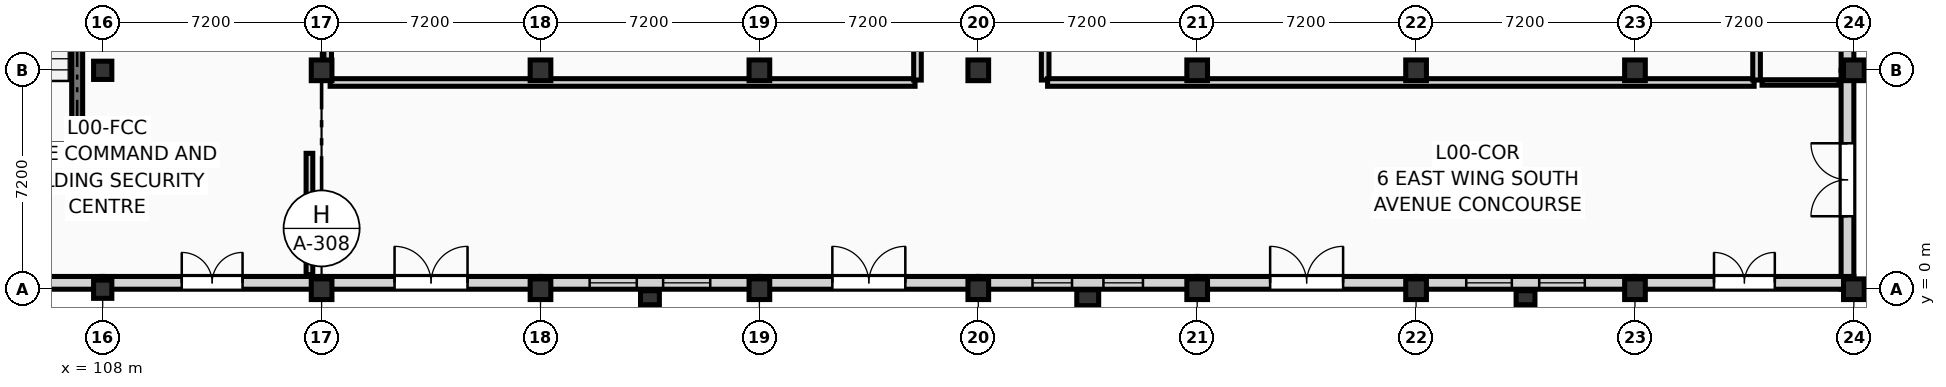
"""IFC4 building model, lengths in metres.
Left out: names, types, materials, properties, quantities, classifications, styles, units other than length and angle.
Written with IfcOpenShell. Run it as: python <this file> out.ifc"""

import sys

from ifc_helpers import new_model, si_unit, direction, frame, frame_2d, origin, origin_2d, place, context, subcontext, project, spatial, rectangle, extrude, element, fill, save


model = new_model("IFC4")
c1 = context("Model", 3, precision=1e-05, world=origin(), true_north=direction((0.0, 1.0)))
c2 = subcontext(c1, "Body", "Model", "MODEL_VIEW")
j1 = project(units=[si_unit("LENGTHUNIT", "METRE"), si_unit("PLANEANGLEUNIT", "RADIAN")], contexts=[c1])
p1 = place(None, origin())
s1 = spatial("IfcSite", under=j1, at=p1, CompositionType="ELEMENT")
p2 = place(p1, origin())
s2 = spatial("IfcBuilding", under=s1, at=p2, CompositionType="ELEMENT")
p3 = place(p2, origin())
s3 = spatial("IfcBuildingStorey", under=s2, at=p3, CompositionType="ELEMENT", Elevation=0.0)
for number, where, z_axis, x_axis in (
    (1, (108.0, 0.0, 0.0), (0.0, 0.0, 1.0), (1.0, 0.0, 0.0)),
    (2, (108.0, 7.2, 0.0), (0.0, 0.0, 1.0), (1.0, 0.0, 0.0)),
):
    element("IfcColumn", number, at=place(p3, frame(where, z_axis=z_axis, x_axis=x_axis)), inside=s3, PredefinedType="COLUMN", context=c2, shape_type="SweptSolid", body=[
        extrude(rectangle(XDim=0.6, YDim=0.6, at=origin_2d()), origin(), (0.0, 0.0, 1.0), 4.5),
    ])
for number, where, z_axis, x_axis in (
    (3, (115.2, 0.0, 0.0), (0.0, 0.0, 1.0), (1.0, 0.0, 0.0)),
    (4, (115.2, 7.2, 0.0), (0.0, 0.0, 1.0), (1.0, 0.0, 0.0)),
    (5, (122.4, 0.0, 0.0), (0.0, 0.0, 1.0), (1.0, 0.0, 0.0)),
    (6, (122.4, 7.2, 0.0), (0.0, 0.0, 1.0), (1.0, 0.0, 0.0)),
    (7, (129.6, 0.0, 0.0), (0.0, 0.0, 1.0), (1.0, 0.0, 0.0)),
    (8, (129.6, 7.2, 0.0), (0.0, 0.0, 1.0), (1.0, 0.0, 0.0)),
    (9, (136.8, 0.0, 0.0), (0.0, 0.0, 1.0), (1.0, 0.0, 0.0)),
    (10, (136.8, 7.2, 0.0), (0.0, 0.0, 1.0), (1.0, 0.0, 0.0)),
    (11, (144.0, 0.0, 0.0), (0.0, 0.0, 1.0), (1.0, 0.0, 0.0)),
    (12, (144.0, 7.2, 0.0), (0.0, 0.0, 1.0), (1.0, 0.0, 0.0)),
    (13, (151.2, 0.0, 0.0), (0.0, 0.0, 1.0), (1.0, 0.0, 0.0)),
    (14, (151.2, 7.2, 0.0), (0.0, 0.0, 1.0), (1.0, 0.0, 0.0)),
    (15, (158.4, 0.0, 0.0), (0.0, 0.0, 1.0), (1.0, 0.0, 0.0)),
    (16, (158.4, 7.2, 0.0), (0.0, 0.0, 1.0), (1.0, 0.0, 0.0)),
    (17, (165.6, 0.0, 0.0), (0.0, 0.0, 1.0), (1.0, 0.0, 0.0)),
    (18, (165.6, 7.2, 0.0), (0.0, 0.0, 1.0), (1.0, 0.0, 0.0)),
):
    element("IfcColumn", number, at=place(p3, frame(where, z_axis=z_axis, x_axis=x_axis)), inside=s3, PredefinedType="COLUMN", context=c2, shape_type="SweptSolid", body=[
        extrude(rectangle(XDim=0.68, YDim=0.68, at=origin_2d()), origin(), (0.0, 0.0, 1.0), 4.5),
    ])
p4 = place(p3, frame((126.0, -0.28, 0.0), z_axis=(0.0, 0.0, 1.0), x_axis=(0.0, 1.0, 0.0)))
e19 = element("IfcColumn", 19, at=p4, inside=s3, PredefinedType="PILASTER", context=c2, shape_type="SweptSolid", body=[
    extrude(rectangle(XDim=0.46, YDim=0.62, at=origin_2d()), origin(), (0.0, 0.0, 1.0), 4.5),
])
p5 = place(p3, frame((140.4, -0.28, 0.0), z_axis=(0.0, 0.0, 1.0), x_axis=(0.0, 1.0, 0.0)))
e20 = element("IfcColumn", 20, at=p5, inside=s3, PredefinedType="PILASTER", context=c2, shape_type="SweptSolid", body=[
    extrude(rectangle(XDim=0.52, YDim=0.72, at=origin_2d()), origin(), (0.0, 0.0, 1.0), 4.5),
])
p6 = place(p3, frame((154.8, -0.28, 0.0), z_axis=(0.0, 0.0, 1.0), x_axis=(0.0, 1.0, 0.0)))
e21 = element("IfcColumn", 21, at=p6, inside=s3, PredefinedType="PILASTER", context=c2, shape_type="SweptSolid", body=[
    extrude(rectangle(XDim=0.46, YDim=0.62, at=origin_2d()), origin(), (0.0, 0.0, 1.0), 4.5),
])
p7 = place(p3, frame((165.39, 7.2, 0.0), z_axis=(0.0, 0.0, 1.0), x_axis=(0.0, 1.0, 0.0)))
e22 = element("IfcWall", 22, at=p7, inside=s3, PredefinedType="SOLIDWALL", context=c2, shape_type="SweptSolid", body=[
    extrude(rectangle(XDim=7.2, YDim=0.42, at=frame_2d((3.6, 0.0))), origin(), (0.0, 0.0, 1.0), 3.62),
])
p8 = place(p7, frame((1.617, 0.0, 0.45)))
e23 = element("IfcOpeningElement", 23, at=p8, cuts=e22, PredefinedType="OPENING", context=c2, shape_type="SweptSolid", body=[
    extrude(rectangle(XDim=1.55, YDim=2.55, at=frame_2d((0.775, 1.275))), frame((0.0, 0.222, 0.0), z_axis=(0.0, -1.0, 0.0), x_axis=(1.0, 0.0, 0.0)), (0.0, 0.0, 1.0), 0.444),
])
p9 = place(p7, frame((4.033, 0.0, 0.45)))
e24 = element("IfcOpeningElement", 24, at=p9, cuts=e22, PredefinedType="OPENING", context=c2, shape_type="SweptSolid", body=[
    extrude(rectangle(XDim=1.55, YDim=2.55, at=frame_2d((0.775, 1.275))), frame((0.0, 0.222, 0.0), z_axis=(0.0, -1.0, 0.0), x_axis=(1.0, 0.0, 0.0)), (0.0, 0.0, 1.0), 0.444),
])
p10 = place(p3, frame((165.39, 0.0, 0.0), z_axis=(0.0, 0.0, 1.0), x_axis=(0.0, 1.0, 0.0)))
e25 = element("IfcWall", 25, at=p10, inside=s3, PredefinedType="SOLIDWALL", context=c2, shape_type="SweptSolid", body=[
    extrude(rectangle(XDim=7.2, YDim=0.42, at=frame_2d((3.6, 0.0))), origin(), (0.0, 0.0, 1.0), 3.62),
])
p11 = place(p10, frame((2.4, 0.0, 0.0)))
e26 = element("IfcOpeningElement", 26, at=p11, cuts=e25, PredefinedType="OPENING", context=c2, shape_type="SweptSolid", body=[
    extrude(rectangle(XDim=2.4, YDim=2.6, at=frame_2d((1.2, 1.3))), frame((0.0, 0.222, 0.0), z_axis=(0.0, -1.0, 0.0), x_axis=(1.0, 0.0, 0.0)), (0.0, 0.0, 1.0), 0.444),
])
p12 = place(p3, frame((158.4, 0.21, 0.0), z_axis=(0.0, 0.0, 1.0), x_axis=(1.0, 0.0, 0.0)))
e27 = element("IfcWall", 27, at=p12, inside=s3, PredefinedType="SOLIDWALL", context=c2, shape_type="SweptSolid", body=[
    extrude(rectangle(XDim=7.2, YDim=0.42, at=frame_2d((3.6, 0.0))), origin(), (0.0, 0.0, 1.0), 3.62),
])
p13 = place(p12, frame((2.6, 0.0, 0.0)))
e28 = element("IfcOpeningElement", 28, at=p13, cuts=e27, PredefinedType="OPENING", context=c2, shape_type="SweptSolid", body=[
    extrude(rectangle(XDim=2.0, YDim=2.4, at=frame_2d((1.0, 1.2))), frame((0.0, 0.222, 0.0), z_axis=(0.0, -1.0, 0.0), x_axis=(1.0, 0.0, 0.0)), (0.0, 0.0, 1.0), 0.444),
])
p14 = place(p3, frame((151.2, 0.21, 0.0), z_axis=(0.0, 0.0, 1.0), x_axis=(1.0, 0.0, 0.0)))
e29 = element("IfcWall", 29, at=p14, inside=s3, PredefinedType="SOLIDWALL", context=c2, shape_type="SweptSolid", body=[
    extrude(rectangle(XDim=7.2, YDim=0.42, at=frame_2d((3.6, 0.0))), origin(), (0.0, 0.0, 1.0), 3.62),
])
p15 = place(p14, frame((1.65, 0.0, 0.45)))
e30 = element("IfcOpeningElement", 30, at=p15, cuts=e29, PredefinedType="OPENING", context=c2, shape_type="SweptSolid", body=[
    extrude(rectangle(XDim=1.5, YDim=2.4, at=frame_2d((0.75, 1.2))), frame((0.0, 0.222, 0.0), z_axis=(0.0, -1.0, 0.0), x_axis=(1.0, 0.0, 0.0)), (0.0, 0.0, 1.0), 0.444),
])
p16 = place(p14, frame((4.05, 0.0, 0.45)))
e31 = element("IfcOpeningElement", 31, at=p16, cuts=e29, PredefinedType="OPENING", context=c2, shape_type="SweptSolid", body=[
    extrude(rectangle(XDim=1.5, YDim=2.4, at=frame_2d((0.75, 1.2))), frame((0.0, 0.222, 0.0), z_axis=(0.0, -1.0, 0.0), x_axis=(1.0, 0.0, 0.0)), (0.0, 0.0, 1.0), 0.444),
])
p17 = place(p3, frame((144.0, 0.21, 0.0), z_axis=(0.0, 0.0, 1.0), x_axis=(1.0, 0.0, 0.0)))
e32 = element("IfcWall", 32, at=p17, inside=s3, PredefinedType="SOLIDWALL", context=c2, shape_type="SweptSolid", body=[
    extrude(rectangle(XDim=7.2, YDim=0.42, at=frame_2d((3.6, 0.0))), origin(), (0.0, 0.0, 1.0), 3.62),
])
p18 = place(p17, frame((2.4, 0.0, 0.0)))
e33 = element("IfcOpeningElement", 33, at=p18, cuts=e32, PredefinedType="OPENING", context=c2, shape_type="SweptSolid", body=[
    extrude(rectangle(XDim=2.4, YDim=2.6, at=frame_2d((1.2, 1.3))), frame((0.0, 0.222, 0.0), z_axis=(0.0, -1.0, 0.0), x_axis=(1.0, 0.0, 0.0)), (0.0, 0.0, 1.0), 0.444),
])
p19 = place(p3, frame((136.8, 0.21, 0.0), z_axis=(0.0, 0.0, 1.0), x_axis=(1.0, 0.0, 0.0)))
e34 = element("IfcWall", 34, at=p19, inside=s3, PredefinedType="SOLIDWALL", context=c2, shape_type="SweptSolid", body=[
    extrude(rectangle(XDim=7.2, YDim=0.42, at=frame_2d((3.6, 0.0))), origin(), (0.0, 0.0, 1.0), 3.62),
])
p20 = place(p19, frame((1.783, 0.0, 0.45)))
e35 = element("IfcOpeningElement", 35, at=p20, cuts=e34, PredefinedType="OPENING", context=c2, shape_type="SweptSolid", body=[
    extrude(rectangle(XDim=1.3, YDim=2.35, at=frame_2d((0.65, 1.175))), frame((0.0, 0.222, 0.0), z_axis=(0.0, -1.0, 0.0), x_axis=(1.0, 0.0, 0.0)), (0.0, 0.0, 1.0), 0.444),
])
p21 = place(p19, frame((4.117, 0.0, 0.45)))
e36 = element("IfcOpeningElement", 36, at=p21, cuts=e34, PredefinedType="OPENING", context=c2, shape_type="SweptSolid", body=[
    extrude(rectangle(XDim=1.3, YDim=2.35, at=frame_2d((0.65, 1.175))), frame((0.0, 0.222, 0.0), z_axis=(0.0, -1.0, 0.0), x_axis=(1.0, 0.0, 0.0)), (0.0, 0.0, 1.0), 0.444),
])
p22 = place(p3, frame((129.6, 0.21, 0.0), z_axis=(0.0, 0.0, 1.0), x_axis=(1.0, 0.0, 0.0)))
e37 = element("IfcWall", 37, at=p22, inside=s3, PredefinedType="SOLIDWALL", context=c2, shape_type="SweptSolid", body=[
    extrude(rectangle(XDim=7.2, YDim=0.42, at=frame_2d((3.6, 0.0))), origin(), (0.0, 0.0, 1.0), 3.62),
])
p23 = place(p22, frame((2.4, 0.0, 0.0)))
e38 = element("IfcOpeningElement", 38, at=p23, cuts=e37, PredefinedType="OPENING", context=c2, shape_type="SweptSolid", body=[
    extrude(rectangle(XDim=2.4, YDim=2.6, at=frame_2d((1.2, 1.3))), frame((0.0, 0.222, 0.0), z_axis=(0.0, -1.0, 0.0), x_axis=(1.0, 0.0, 0.0)), (0.0, 0.0, 1.0), 0.444),
])
p24 = place(p3, frame((122.4, 0.21, 0.0), z_axis=(0.0, 0.0, 1.0), x_axis=(1.0, 0.0, 0.0)))
e39 = element("IfcWall", 39, at=p24, inside=s3, PredefinedType="SOLIDWALL", context=c2, shape_type="SweptSolid", body=[
    extrude(rectangle(XDim=7.2, YDim=0.42, at=frame_2d((3.6, 0.0))), origin(), (0.0, 0.0, 1.0), 3.62),
])
p25 = place(p24, frame((1.617, 0.0, 0.45)))
e40 = element("IfcOpeningElement", 40, at=p25, cuts=e39, PredefinedType="OPENING", context=c2, shape_type="SweptSolid", body=[
    extrude(rectangle(XDim=1.55, YDim=2.85, at=frame_2d((0.775, 1.425))), frame((0.0, 0.222, 0.0), z_axis=(0.0, -1.0, 0.0), x_axis=(1.0, 0.0, 0.0)), (0.0, 0.0, 1.0), 0.444),
])
p26 = place(p24, frame((4.033, 0.0, 0.45)))
e41 = element("IfcOpeningElement", 41, at=p26, cuts=e39, PredefinedType="OPENING", context=c2, shape_type="SweptSolid", body=[
    extrude(rectangle(XDim=1.55, YDim=2.85, at=frame_2d((0.775, 1.425))), frame((0.0, 0.222, 0.0), z_axis=(0.0, -1.0, 0.0), x_axis=(1.0, 0.0, 0.0)), (0.0, 0.0, 1.0), 0.444),
])
p27 = place(p3, frame((115.2, 0.21, 0.0), z_axis=(0.0, 0.0, 1.0), x_axis=(1.0, 0.0, 0.0)))
e42 = element("IfcWall", 42, at=p27, inside=s3, PredefinedType="SOLIDWALL", context=c2, shape_type="SweptSolid", body=[
    extrude(rectangle(XDim=7.2, YDim=0.42, at=frame_2d((3.6, 0.0))), origin(), (0.0, 0.0, 1.0), 3.62),
])
p28 = place(p27, frame((2.4, 0.0, 0.0)))
e43 = element("IfcOpeningElement", 43, at=p28, cuts=e42, PredefinedType="OPENING", context=c2, shape_type="SweptSolid", body=[
    extrude(rectangle(XDim=2.4, YDim=2.6, at=frame_2d((1.2, 1.3))), frame((0.0, 0.222, 0.0), z_axis=(0.0, -1.0, 0.0), x_axis=(1.0, 0.0, 0.0)), (0.0, 0.0, 1.0), 0.444),
])
p29 = place(p3, frame((108.0, 0.21, 0.0), z_axis=(0.0, 0.0, 1.0), x_axis=(1.0, 0.0, 0.0)))
e44 = element("IfcWall", 44, at=p29, inside=s3, PredefinedType="SOLIDWALL", context=c2, shape_type="SweptSolid", body=[
    extrude(rectangle(XDim=7.2, YDim=0.42, at=frame_2d((3.6, 0.0))), origin(), (0.0, 0.0, 1.0), 3.62),
])
p30 = place(p29, frame((2.6, 0.0, 0.0)))
e45 = element("IfcOpeningElement", 45, at=p30, cuts=e44, PredefinedType="OPENING", context=c2, shape_type="SweptSolid", body=[
    extrude(rectangle(XDim=2.0, YDim=2.4, at=frame_2d((1.0, 1.2))), frame((0.0, 0.222, 0.0), z_axis=(0.0, -1.0, 0.0), x_axis=(1.0, 0.0, 0.0)), (0.0, 0.0, 1.0), 0.444),
])
p31 = place(p3, frame((100.8, 0.21, 0.0), z_axis=(0.0, 0.0, 1.0), x_axis=(1.0, 0.0, 0.0)))
e46 = element("IfcWall", 46, at=p31, inside=s3, PredefinedType="SOLIDWALL", context=c2, shape_type="SweptSolid", body=[
    extrude(rectangle(XDim=7.2, YDim=0.42, at=frame_2d((3.6, 0.0))), origin(), (0.0, 0.0, 1.0), 3.62),
])
p32 = place(p31, frame((2.4, 0.0, 0.0)))
e47 = element("IfcOpeningElement", 47, at=p32, cuts=e46, PredefinedType="OPENING", context=c2, shape_type="SweptSolid", body=[
    extrude(rectangle(XDim=2.4, YDim=2.6, at=frame_2d((1.2, 1.3))), frame((0.0, 0.222, 0.0), z_axis=(0.0, -1.0, 0.0), x_axis=(1.0, 0.0, 0.0)), (0.0, 0.0, 1.0), 0.444),
])
p33 = place(p3, frame((101.46, 4.6, 0.0), z_axis=(0.0, 0.0, 1.0), x_axis=(1.0, 0.0, 0.0)))
e48 = element("IfcWall", 48, at=p33, inside=s3, PredefinedType="SHEAR", context=c2, shape_type="SweptSolid", body=[
    extrude(rectangle(XDim=5.88, YDim=0.36, at=frame_2d((2.94, 0.0))), origin(), (0.0, 0.0, 1.0), 4.25),
])
p34 = place(p33, frame((0.22, 0.0, 0.0)))
e49 = element("IfcOpeningElement", 49, at=p34, cuts=e48, PredefinedType="OPENING", context=c2, shape_type="SweptSolid", body=[
    extrude(rectangle(XDim=1.8, YDim=2.2, at=frame_2d((0.9, 1.1))), frame((0.0, 0.192, 0.0), z_axis=(0.0, -1.0, 0.0), x_axis=(1.0, 0.0, 0.0)), (0.0, 0.0, 1.0), 0.384),
])
p35 = place(p3, frame((107.16, 4.78, 0.0), z_axis=(0.0, 0.0, 1.0), x_axis=(0.0, 1.0, 0.0)))
e50 = element("IfcWall", 50, at=p35, inside=s3, PredefinedType="SHEAR", context=c2, shape_type="SweptSolid", body=[
    extrude(rectangle(XDim=8.59, YDim=0.36, at=frame_2d((4.295, 0.0))), origin(), (0.0, 0.0, 1.0), 4.25),
])
p36 = place(p3, frame((114.8, 0.48, 0.0), z_axis=(0.0, 0.0, 1.0), x_axis=(0.0, 1.0, 0.0)))
e51 = element("IfcWall", 51, at=p36, inside=s3, PredefinedType="PARTITIONING", context=c2, shape_type="SweptSolid", body=[
    extrude(rectangle(XDim=3.99, YDim=0.22, at=frame_2d((1.995, 0.0))), origin(), (0.0, 0.0, 1.0), 3.385),
])
p37 = place(p3, frame((115.4, 6.88, 0.0), z_axis=(0.0, 0.0, 1.0), x_axis=(0.0, 1.0, 0.0)))
e52 = element("IfcWall", 52, at=p37, inside=s3, PredefinedType="PARTITIONING", context=c2, shape_type="SweptSolid", body=[
    extrude(rectangle(XDim=17.14, YDim=0.25, at=frame_2d((8.57, 0.0))), origin(), (0.0, 0.0, 1.0), 3.385),
])
p38 = place(p37, frame((2.4, 0.0, 0.0)))
e53 = element("IfcOpeningElement", 53, at=p38, cuts=e52, PredefinedType="OPENING", context=c2, shape_type="SweptSolid", body=[
    extrude(rectangle(XDim=1.8, YDim=2.3, at=frame_2d((0.9, 1.15))), frame((0.0, 0.137, 0.0), z_axis=(0.0, -1.0, 0.0), x_axis=(1.0, 0.0, 0.0)), (0.0, 0.0, 1.0), 0.274),
])
p39 = place(p3, frame((115.48, 6.8, 0.0), z_axis=(0.0, 0.0, 1.0), x_axis=(1.0, 0.0, 0.0)))
e54 = element("IfcWall", 54, at=p39, inside=s3, PredefinedType="PARTITIONING", context=c2, shape_type="SweptSolid", body=[
    extrude(rectangle(XDim=19.24, YDim=0.25, at=frame_2d((9.62, 0.0))), origin(), (0.0, 0.0, 1.0), 7.525),
])
for number, where, z_axis, x_axis in (
    (55, (134.8, 6.88, 0.0), (0.0, 0.0, 1.0), (0.0, 1.0, 0.0)),
    (56, (139.0, 6.88, 0.0), (0.0, 0.0, 1.0), (0.0, 1.0, 0.0)),
):
    element("IfcWall", number, at=place(p3, frame(where, z_axis=z_axis, x_axis=x_axis)), inside=s3, PredefinedType="PARTITIONING", context=c2, shape_type="SweptSolid", body=[
        extrude(rectangle(XDim=17.14, YDim=0.25, at=frame_2d((8.57, 0.0))), origin(), (0.0, 0.0, 1.0), 8.185),
    ])
p40 = place(p3, frame((139.08, 6.8, 0.0), z_axis=(0.0, 0.0, 1.0), x_axis=(1.0, 0.0, 0.0)))
e57 = element("IfcWall", 57, at=p40, inside=s3, PredefinedType="PARTITIONING", context=c2, shape_type="SweptSolid", body=[
    extrude(rectangle(XDim=23.24, YDim=0.25, at=frame_2d((11.62, 0.0))), origin(), (0.0, 0.0, 1.0), 7.525),
])
p41 = place(p3, frame((162.4, 6.88, 0.0), z_axis=(0.0, 0.0, 1.0), x_axis=(0.0, 1.0, 0.0)))
e58 = element("IfcWall", 58, at=p41, inside=s3, PredefinedType="PARTITIONING", context=c2, shape_type="SweptSolid", body=[
    extrude(rectangle(XDim=17.14, YDim=0.25, at=frame_2d((8.57, 0.0))), origin(), (0.0, 0.0, 1.0), 8.185),
])
p42 = place(p3, frame((162.58, 6.8, 0.0), z_axis=(0.0, 0.0, 1.0), x_axis=(1.0, 0.0, 0.0)))
e59 = element("IfcWall", 59, at=p42, inside=s3, PredefinedType="PARTITIONING", context=c2, shape_type="SweptSolid", body=[
    extrude(rectangle(XDim=2.54, YDim=0.18, at=frame_2d((1.27, 0.0))), origin(), (0.0, 0.0, 1.0), 4.235),
])
p43 = place(p11, origin())
e60 = element("IfcDoor", 60, at=p43, inside=s3, OperationType="DOUBLE_DOOR_SINGLE_SWING", PredefinedType="DOOR", context=c2, shape_type="SweptSolid", body=[
    extrude(rectangle(XDim=2.4, YDim=2.6, at=frame_2d((1.2, 1.3))), frame((0.0, 0.025, 0.0), z_axis=(0.0, -1.0, 0.0), x_axis=(1.0, 0.0, 0.0)), (0.0, 0.0, 1.0), 0.05),
])
fill(e26, e60)
p44 = place(p13, origin())
e61 = element("IfcDoor", 61, at=p44, inside=s3, OperationType="DOUBLE_DOOR_SINGLE_SWING", PredefinedType="DOOR", context=c2, shape_type="SweptSolid", body=[
    extrude(rectangle(XDim=2.0, YDim=2.4, at=frame_2d((1.0, 1.2))), frame((0.0, 0.025, 0.0), z_axis=(0.0, -1.0, 0.0), x_axis=(1.0, 0.0, 0.0)), (0.0, 0.0, 1.0), 0.05),
])
fill(e28, e61)
p45 = place(p15, origin())
e62 = element("IfcWindow", 62, at=p45, inside=s3, PartitioningType="SINGLE_PANEL", PredefinedType="WINDOW", context=c2, shape_type="SweptSolid", body=[
    extrude(rectangle(XDim=1.5, YDim=2.4, at=frame_2d((0.75, 1.2))), frame((0.0, 0.03, 0.0), z_axis=(0.0, -1.0, 0.0), x_axis=(1.0, 0.0, 0.0)), (0.0, 0.0, 1.0), 0.06),
])
fill(e30, e62)
p46 = place(p16, origin())
e63 = element("IfcWindow", 63, at=p46, inside=s3, PartitioningType="SINGLE_PANEL", PredefinedType="WINDOW", context=c2, shape_type="SweptSolid", body=[
    extrude(rectangle(XDim=1.5, YDim=2.4, at=frame_2d((0.75, 1.2))), frame((0.0, 0.03, 0.0), z_axis=(0.0, -1.0, 0.0), x_axis=(1.0, 0.0, 0.0)), (0.0, 0.0, 1.0), 0.06),
])
fill(e31, e63)
p47 = place(p18, origin())
e64 = element("IfcDoor", 64, at=p47, inside=s3, OperationType="DOUBLE_DOOR_SINGLE_SWING", PredefinedType="DOOR", context=c2, shape_type="SweptSolid", body=[
    extrude(rectangle(XDim=2.4, YDim=2.6, at=frame_2d((1.2, 1.3))), frame((0.0, 0.025, 0.0), z_axis=(0.0, -1.0, 0.0), x_axis=(1.0, 0.0, 0.0)), (0.0, 0.0, 1.0), 0.05),
])
fill(e33, e64)
p48 = place(p20, origin())
e65 = element("IfcWindow", 65, at=p48, inside=s3, PartitioningType="SINGLE_PANEL", PredefinedType="WINDOW", context=c2, shape_type="SweptSolid", body=[
    extrude(rectangle(XDim=1.3, YDim=2.35, at=frame_2d((0.65, 1.175))), frame((0.0, 0.03, 0.0), z_axis=(0.0, -1.0, 0.0), x_axis=(1.0, 0.0, 0.0)), (0.0, 0.0, 1.0), 0.06),
])
fill(e35, e65)
p49 = place(p21, origin())
e66 = element("IfcWindow", 66, at=p49, inside=s3, PartitioningType="SINGLE_PANEL", PredefinedType="WINDOW", context=c2, shape_type="SweptSolid", body=[
    extrude(rectangle(XDim=1.3, YDim=2.35, at=frame_2d((0.65, 1.175))), frame((0.0, 0.03, 0.0), z_axis=(0.0, -1.0, 0.0), x_axis=(1.0, 0.0, 0.0)), (0.0, 0.0, 1.0), 0.06),
])
fill(e36, e66)
p50 = place(p23, origin())
e67 = element("IfcDoor", 67, at=p50, inside=s3, OperationType="DOUBLE_DOOR_SINGLE_SWING", PredefinedType="DOOR", context=c2, shape_type="SweptSolid", body=[
    extrude(rectangle(XDim=2.4, YDim=2.6, at=frame_2d((1.2, 1.3))), frame((0.0, 0.025, 0.0), z_axis=(0.0, -1.0, 0.0), x_axis=(1.0, 0.0, 0.0)), (0.0, 0.0, 1.0), 0.05),
])
fill(e38, e67)
p51 = place(p25, origin())
e68 = element("IfcWindow", 68, at=p51, inside=s3, PartitioningType="SINGLE_PANEL", PredefinedType="WINDOW", context=c2, shape_type="SweptSolid", body=[
    extrude(rectangle(XDim=1.55, YDim=2.85, at=frame_2d((0.775, 1.425))), frame((0.0, 0.03, 0.0), z_axis=(0.0, -1.0, 0.0), x_axis=(1.0, 0.0, 0.0)), (0.0, 0.0, 1.0), 0.06),
])
fill(e40, e68)
p52 = place(p26, origin())
e69 = element("IfcWindow", 69, at=p52, inside=s3, PartitioningType="SINGLE_PANEL", PredefinedType="WINDOW", context=c2, shape_type="SweptSolid", body=[
    extrude(rectangle(XDim=1.55, YDim=2.85, at=frame_2d((0.775, 1.425))), frame((0.0, 0.03, 0.0), z_axis=(0.0, -1.0, 0.0), x_axis=(1.0, 0.0, 0.0)), (0.0, 0.0, 1.0), 0.06),
])
fill(e41, e69)
p53 = place(p28, origin())
e70 = element("IfcDoor", 70, at=p53, inside=s3, OperationType="DOUBLE_DOOR_SINGLE_SWING", PredefinedType="DOOR", context=c2, shape_type="SweptSolid", body=[
    extrude(rectangle(XDim=2.4, YDim=2.6, at=frame_2d((1.2, 1.3))), frame((0.0, 0.025, 0.0), z_axis=(0.0, -1.0, 0.0), x_axis=(1.0, 0.0, 0.0)), (0.0, 0.0, 1.0), 0.05),
])
fill(e43, e70)
p54 = place(p30, origin())
e71 = element("IfcDoor", 71, at=p54, inside=s3, OperationType="DOUBLE_DOOR_SINGLE_SWING", PredefinedType="DOOR", context=c2, shape_type="SweptSolid", body=[
    extrude(rectangle(XDim=2.0, YDim=2.4, at=frame_2d((1.0, 1.2))), frame((0.0, 0.025, 0.0), z_axis=(0.0, -1.0, 0.0), x_axis=(1.0, 0.0, 0.0)), (0.0, 0.0, 1.0), 0.05),
])
fill(e45, e71)
save(model, sys.argv[1])
